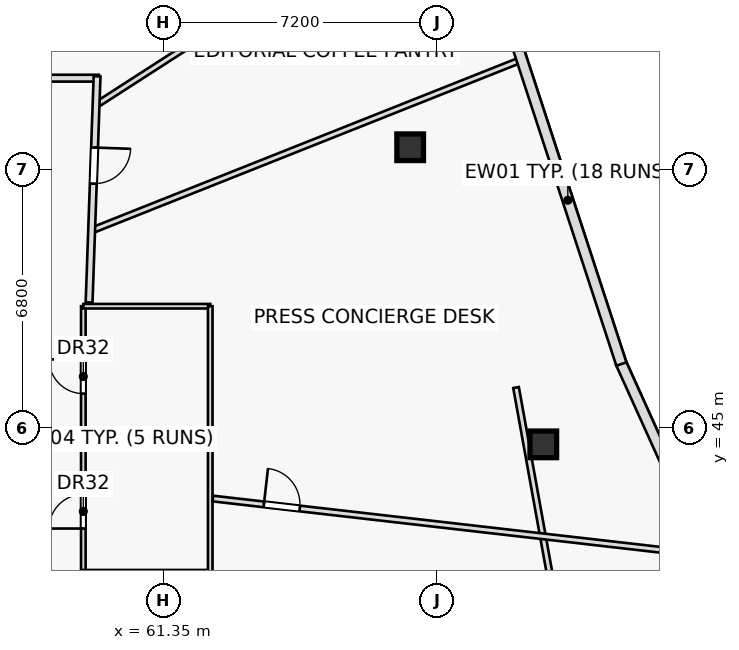
"""IFC4 building model, lengths in metres.
Left out: names, types, materials, properties, quantities, classifications, styles, units other than length and angle.
Written with IfcOpenShell. Run it as: python <this file> out.ifc"""

import sys

from ifc_helpers import new_model, si_unit, direction, frame, frame_2d, origin, origin_2d, place, context, subcontext, project, spatial, rectangle, hollow_rectangle, extrude, element, fill, save


model = new_model("IFC4")
c1 = context("Model", 3, precision=1e-05, world=origin(), true_north=direction((0.0, 1.0)))
c2 = subcontext(c1, "Body", "Model", "MODEL_VIEW")
j1 = project(units=[si_unit("LENGTHUNIT", "METRE"), si_unit("PLANEANGLEUNIT", "RADIAN")], contexts=[c1])
p1 = place(None, origin())
s1 = spatial("IfcSite", under=j1, at=p1, CompositionType="ELEMENT")
p2 = place(p1, origin())
s2 = spatial("IfcBuilding", under=s1, at=p2, CompositionType="ELEMENT")
p3 = place(p2, frame((0.0, 0.0, 74.4)))
s3 = spatial("IfcBuildingStorey", under=s2, at=p3, CompositionType="ELEMENT", Elevation=74.4)
for number, where, z_axis, x_axis in (
    (1, (71.344, 44.565, 0.0), (0.0, 0.0, 1.0), (1.0, 0.0, 0.0)),
    (2, (67.841, 52.383, 0.0), (0.0, 0.0, 1.0), (1.0, 0.0, 0.0)),
):
    element("IfcColumn", number, at=place(p3, frame(where, z_axis=z_axis, x_axis=x_axis)), inside=s3, PredefinedType="COLUMN", context=c2, shape_type="SweptSolid", body=[
        extrude(hollow_rectangle(XDim=0.7, YDim=0.7, WallThickness=0.04, at=origin_2d()), origin(), (0.0, 0.0, 1.0), 3.6),
    ])
p4 = place(p3, frame((72.969, 33.091, 0.0), z_axis=(0.0, 0.0, 1.0), x_axis=(-0.177742578179, 0.984077017261, 0.0)))
e3 = element("IfcWall", 3, at=p4, inside=s3, PredefinedType="PARTITIONING", context=c2, shape_type="SweptSolid", body=[
    extrude(rectangle(XDim=13.179, YDim=0.15, at=frame_2d((6.59, 0.0))), origin(), (0.0, 0.0, 1.0), 2.975),
])
p5 = place(p3, frame((59.24, 41.2, 0.0), z_axis=(0.0, 0.0, 1.0), x_axis=(0.0, 1.0, 0.0)))
e4 = element("IfcWall", 4, at=p5, inside=s3, PredefinedType="PARTITIONING", context=c2, shape_type="SweptSolid", body=[
    extrude(rectangle(XDim=7.0, YDim=0.12, at=frame_2d((3.5, 0.0))), origin(), (0.0, 0.0, 1.0), 3.6),
])
p6 = place(p5, frame((1.15, 0.0, 0.0)))
e5 = element("IfcOpeningElement", 5, at=p6, cuts=e4, PredefinedType="OPENING", context=c2, shape_type="SweptSolid", body=[
    extrude(rectangle(XDim=0.9, YDim=2.05, at=frame_2d((0.45, 1.025))), frame((0.0, 0.07, 0.0), z_axis=(0.0, -1.0, 0.0), x_axis=(1.0, 0.0, 0.0)), (0.0, 0.0, 1.0), 0.14),
])
p7 = place(p5, frame((4.7, 0.0, 0.0)))
e6 = element("IfcOpeningElement", 6, at=p7, cuts=e4, PredefinedType="OPENING", context=c2, shape_type="SweptSolid", body=[
    extrude(rectangle(XDim=0.9, YDim=2.05, at=frame_2d((0.45, 1.025))), frame((0.0, 0.07, 0.0), z_axis=(0.0, -1.0, 0.0), x_axis=(1.0, 0.0, 0.0)), (0.0, 0.0, 1.0), 0.14),
])
p8 = place(p3, frame((59.24, 41.2, 0.0), z_axis=(0.0, 0.0, 1.0), x_axis=(1.0, 0.0, 0.0)))
e7 = element("IfcWall", 7, at=p8, inside=s3, PredefinedType="PARTITIONING", context=c2, shape_type="SweptSolid", body=[
    extrude(rectangle(XDim=3.34, YDim=0.12, at=frame_2d((1.67, 0.0))), origin(), (0.0, 0.0, 1.0), 2.975),
])
for number, where, z_axis, x_axis in (
    (8, (59.24, 44.65, 0.0), (0.0, 0.0, 1.0), (1.0, 0.0, 0.0)),
    (9, (59.24, 48.2, 0.0), (0.0, 0.0, 1.0), (1.0, 0.0, 0.0)),
):
    element("IfcWall", number, at=place(p3, frame(where, z_axis=z_axis, x_axis=x_axis)), inside=s3, PredefinedType="PARTITIONING", context=c2, shape_type="SweptSolid", body=[
        extrude(rectangle(XDim=3.34, YDim=0.12, at=frame_2d((1.67, 0.0))), origin(), (0.0, 0.0, 1.0), 3.6),
    ])
p9 = place(p3, frame((62.58, 41.2, 0.0), z_axis=(0.0, 0.0, 1.0), x_axis=(0.0, 1.0, 0.0)))
e10 = element("IfcWall", 10, at=p9, inside=s3, PredefinedType="PARTITIONING", context=c2, shape_type="SweptSolid", body=[
    extrude(rectangle(XDim=7.0, YDim=0.12, at=frame_2d((3.5, 0.0))), origin(), (0.0, 0.0, 1.0), 3.6),
])
p10 = place(p3, frame((62.65, 43.139, 0.0), z_axis=(0.0, 0.0, 1.0), x_axis=(0.993507819436, -0.113763846275, 0.0)))
e11 = element("IfcWall", 11, at=p10, inside=s3, PredefinedType="PARTITIONING", context=c2, shape_type="SweptSolid", body=[
    extrude(rectangle(XDim=13.121, YDim=0.15, at=frame_2d((6.561, 0.0))), origin(), (0.0, 0.0, 1.0), 2.975),
])
p11 = place(p10, frame((1.35, 0.0, 0.0)))
e12 = element("IfcOpeningElement", 12, at=p11, cuts=e11, PredefinedType="OPENING", context=c2, shape_type="SweptSolid", body=[
    extrude(rectangle(XDim=0.95, YDim=2.05, at=frame_2d((0.475, 1.025))), frame((0.0, 0.085, 0.0), z_axis=(0.0, -1.0, 0.0), x_axis=(1.0, 0.0, 0.0)), (0.0, 0.0, 1.0), 0.17),
])
p12 = place(p3, frame((59.458, 50.191, 0.0), z_axis=(0.0, 0.0, 1.0), x_axis=(0.929265937883, 0.369411446344, 0.0)))
e13 = element("IfcWall", 13, at=p12, inside=s3, PredefinedType="PARTITIONING", context=c2, shape_type="SweptSolid", body=[
    extrude(rectangle(XDim=12.191, YDim=0.15, at=frame_2d((6.096, 0.0))), origin(), (0.0, 0.0, 1.0), 2.975),
])
p13 = place(p3, frame((59.575, 53.49, 0.0), z_axis=(0.0, 0.0, 1.0), x_axis=(0.840570280129, 0.541702505222, 0.0)))
e14 = element("IfcWall", 14, at=p13, inside=s3, PredefinedType="PARTITIONING", context=c2, shape_type="SweptSolid", body=[
    extrude(rectangle(XDim=9.816, YDim=0.15, at=frame_2d((4.908, 0.0))), origin(), (0.0, 0.0, 1.0), 3.025),
])
p14 = place(p3, frame((54.3, 54.2, 0.0), z_axis=(0.0, 0.0, 1.0), x_axis=(1.0, 0.0, 0.0)))
e15 = element("IfcWall", 15, at=p14, inside=s3, PredefinedType="PARTITIONING", context=c2, shape_type="SweptSolid", body=[
    extrude(rectangle(XDim=5.35, YDim=0.18, at=frame_2d((2.675, 0.0))), origin(), (0.0, 0.0, 1.0), 2.975),
])
p15 = place(p14, frame((2.2, 0.0, 0.0)))
e16 = element("IfcOpeningElement", 16, at=p15, cuts=e15, PredefinedType="OPENING", context=c2, shape_type="SweptSolid", body=[
    extrude(rectangle(XDim=0.95, YDim=2.05, at=frame_2d((0.475, 1.025))), frame((0.0, 0.1, 0.0), z_axis=(0.0, -1.0, 0.0), x_axis=(1.0, 0.0, 0.0)), (0.0, 0.0, 1.0), 0.2),
])
p16 = place(p3, frame((59.602, 54.25, 0.0), z_axis=(0.0, 0.0, 1.0), x_axis=(-0.035265891834, -0.999377964973, 0.0)))
e17 = element("IfcWall", 17, at=p16, inside=s3, PredefinedType="PARTITIONING", context=c2, shape_type="SweptSolid", body=[
    extrude(rectangle(XDim=5.954, YDim=0.18, at=frame_2d((2.977, 0.0))), origin(), (0.0, 0.0, 1.0), 2.975),
])
p17 = place(p16, frame((1.876, 0.0, 0.0)))
e18 = element("IfcOpeningElement", 18, at=p17, cuts=e17, PredefinedType="OPENING", context=c2, shape_type="SweptSolid", body=[
    extrude(rectangle(XDim=0.95, YDim=2.05, at=frame_2d((0.475, 1.025))), frame((0.0, 0.1, 0.0), z_axis=(0.0, -1.0, 0.0), x_axis=(1.0, 0.0, 0.0)), (0.0, 0.0, 1.0), 0.2),
])
p18 = place(p3, frame((76.88, 38.98, 0.0), z_axis=(0.0, 0.0, 1.0), x_axis=(-0.411879874827, 0.91123815148, 0.0)))
e19 = element("IfcWall", 19, at=p18, inside=s3, PredefinedType="STANDARD", context=c2, shape_type="SweptSolid", body=[
    extrude(rectangle(XDim=8.479, YDim=0.28, at=frame_2d((4.239, 0.0))), origin(), (0.0, 0.0, 1.0), 3.6),
])
p19 = place(p3, frame((73.398, 46.678, 0.0), z_axis=(0.0, 0.0, 1.0), x_axis=(-0.310803401324, 0.950474221494, 0.0)))
e20 = element("IfcWall", 20, at=p19, inside=s3, PredefinedType="STANDARD", context=c2, shape_type="SweptSolid", body=[
    extrude(rectangle(XDim=9.069, YDim=0.28, at=frame_2d((4.534, 0.0))), origin(), (0.0, 0.0, 1.0), 3.6),
])
p20 = place(p6, origin())
e21 = element("IfcDoor", 21, at=p20, inside=s3, OperationType="SINGLE_SWING_LEFT", PredefinedType="DOOR", context=c2, shape_type="SweptSolid", body=[
    extrude(rectangle(XDim=0.9, YDim=2.05, at=frame_2d((0.45, 1.025))), frame((0.0, 0.025, 0.0), z_axis=(0.0, -1.0, 0.0), x_axis=(1.0, 0.0, 0.0)), (0.0, 0.0, 1.0), 0.05),
])
fill(e5, e21)
p21 = place(p7, origin())
e22 = element("IfcDoor", 22, at=p21, inside=s3, OperationType="SINGLE_SWING_RIGHT", PredefinedType="DOOR", context=c2, shape_type="SweptSolid", body=[
    extrude(rectangle(XDim=0.9, YDim=2.05, at=frame_2d((0.45, 1.025))), frame((0.0, 0.025, 0.0), z_axis=(0.0, -1.0, 0.0), x_axis=(1.0, 0.0, 0.0)), (0.0, 0.0, 1.0), 0.05),
])
fill(e6, e22)
p22 = place(p11, origin())
e23 = element("IfcDoor", 23, at=p22, inside=s3, OperationType="SINGLE_SWING_LEFT", PredefinedType="DOOR", context=c2, shape_type="SweptSolid", body=[
    extrude(rectangle(XDim=0.95, YDim=2.05, at=frame_2d((0.475, 1.025))), frame((0.0, 0.025, 0.0), z_axis=(0.0, -1.0, 0.0), x_axis=(1.0, 0.0, 0.0)), (0.0, 0.0, 1.0), 0.05),
])
fill(e12, e23)
p23 = place(p17, origin())
e24 = element("IfcDoor", 24, at=p23, inside=s3, OperationType="SINGLE_SWING_LEFT", PredefinedType="DOOR", context=c2, shape_type="SweptSolid", body=[
    extrude(rectangle(XDim=0.95, YDim=2.05, at=frame_2d((0.475, 1.025))), frame((0.0, 0.025, 0.0), z_axis=(0.0, -1.0, 0.0), x_axis=(1.0, 0.0, 0.0)), (0.0, 0.0, 1.0), 0.05),
])
fill(e18, e24)
save(model, sys.argv[1])
